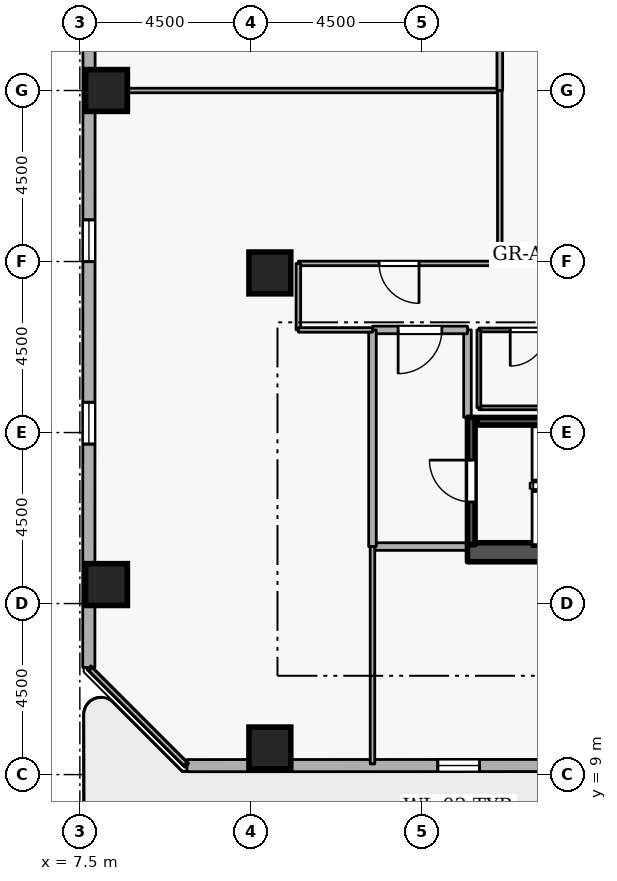
"""IFC4 building model, lengths in metres.
Left out: names, types, materials, properties, quantities, classifications, styles, units other than length and angle.
Written with IfcOpenShell. Run it as: python <this file> out.ifc"""

import sys

from ifc_helpers import new_model, si_unit, direction, frame, frame_2d, origin, origin_2d, place, context, subcontext, project, spatial, rectangle, extrude, element, fill, save


model = new_model("IFC4")
c1 = context("Model", 3, precision=1e-05, world=origin(), true_north=direction((0.0, 1.0)))
c2 = subcontext(c1, "Body", "Model", "MODEL_VIEW")
j1 = project(units=[si_unit("LENGTHUNIT", "METRE"), si_unit("PLANEANGLEUNIT", "RADIAN")], contexts=[c1])
p1 = place(None, origin())
s1 = spatial("IfcSite", under=j1, at=p1, CompositionType="ELEMENT")
p2 = place(p1, origin())
s2 = spatial("IfcBuilding", under=s1, at=p2, CompositionType="ELEMENT")
p3 = place(p2, frame((0.0, 0.0, 174.3)))
s3 = spatial("IfcBuildingStorey", under=s2, at=p3, CompositionType="ELEMENT", Elevation=174.3)
p4 = place(p3, frame((17.7, 14.85, 0.0), z_axis=(0.0, 0.0, 1.0), x_axis=(1.0, 0.0, 0.0)))
e1 = element("IfcWall", 1, at=p4, inside=s3, PredefinedType="SHEAR", context=c2, shape_type="SweptSolid", body=[
    extrude(rectangle(XDim=15.6, YDim=0.5, at=frame_2d((7.8, 0.0))), origin(), (0.0, 0.0, 1.0), 4.2),
])
for number, where, z_axis, x_axis in (
    (2, (12.5, 9.7, 0.0), (0.0, 0.0, 1.0), (1.0, 0.0, 0.0)),
    (3, (8.2, 14.0, 0.0), (0.0, 0.0, 1.0), (1.0, 0.0, 0.0)),
    (4, (8.2, 27.0, 0.0), (0.0, 0.0, 1.0), (1.0, 0.0, 0.0)),
    (5, (12.5, 22.2, 0.0), (0.0, 0.0, 1.0), (1.0, 0.0, 0.0)),
):
    element("IfcColumn", number, at=place(p3, frame(where, z_axis=z_axis, x_axis=x_axis)), inside=s3, PredefinedType="COLUMN", context=c2, shape_type="SweptSolid", body=[
        extrude(rectangle(XDim=1.1, YDim=1.1, at=origin_2d()), origin(), (0.0, 0.0, 1.0), 4.2),
    ])
p5 = place(p3, frame((10.319, 9.235, 0.0), z_axis=(0.0, 0.0, 1.0), x_axis=(0.999999933399, 0.000364968916, 0.0)))
e6 = element("IfcWall", 6, at=p5, inside=s3, PredefinedType="STANDARD", context=c2, shape_type="SweptSolid", body=[
    extrude(rectangle(XDim=32.778, YDim=0.32, at=frame_2d((16.389, 0.0))), origin(), (0.0, 0.0, 1.0), 3.3),
])
p6 = place(p5, frame((23.514, 0.0, 0.0)))
e7 = element("IfcOpeningElement", 7, at=p6, cuts=e6, PredefinedType="OPENING", context=c2, shape_type="SweptSolid", body=[
    extrude(rectangle(XDim=1.15, YDim=2.1, at=frame_2d((0.575, 1.05))), frame((0.0, 0.17, 0.0), z_axis=(0.0, -1.0, 0.0), x_axis=(1.0, 0.0, 0.0)), (0.0, 0.0, 1.0), 0.34),
])
p7 = place(p5, frame((6.6, 0.0, 0.72)))
e8 = element("IfcOpeningElement", 8, at=p7, cuts=e6, PredefinedType="OPENING", context=c2, shape_type="SweptSolid", body=[
    extrude(rectangle(XDim=1.1, YDim=1.8, at=frame_2d((0.55, 0.9))), frame((0.0, 0.17, 0.0), z_axis=(0.0, -1.0, 0.0), x_axis=(1.0, 0.0, 0.0)), (0.0, 0.0, 1.0), 0.34),
])
p8 = place(p5, frame((11.4, 0.0, 0.72)))
e9 = element("IfcOpeningElement", 9, at=p8, cuts=e6, PredefinedType="OPENING", context=c2, shape_type="SweptSolid", body=[
    extrude(rectangle(XDim=1.1, YDim=1.8, at=frame_2d((0.55, 0.9))), frame((0.0, 0.17, 0.0), z_axis=(0.0, -1.0, 0.0), x_axis=(1.0, 0.0, 0.0)), (0.0, 0.0, 1.0), 0.34),
])
p9 = place(p5, frame((21.0, 0.0, 0.72)))
e10 = element("IfcOpeningElement", 10, at=p9, cuts=e6, PredefinedType="OPENING", context=c2, shape_type="SweptSolid", body=[
    extrude(rectangle(XDim=1.1, YDim=1.8, at=frame_2d((0.55, 0.9))), frame((0.0, 0.17, 0.0), z_axis=(0.0, -1.0, 0.0), x_axis=(1.0, 0.0, 0.0)), (0.0, 0.0, 1.0), 0.34),
])
p10 = place(p5, frame((25.8, 0.0, 0.72)))
e11 = element("IfcOpeningElement", 11, at=p10, cuts=e6, PredefinedType="OPENING", context=c2, shape_type="SweptSolid", body=[
    extrude(rectangle(XDim=1.1, YDim=1.8, at=frame_2d((0.55, 0.9))), frame((0.0, 0.17, 0.0), z_axis=(0.0, -1.0, 0.0), x_axis=(1.0, 0.0, 0.0)), (0.0, 0.0, 1.0), 0.34),
])
p11 = place(p3, frame((7.747, 44.596, 0.0), z_axis=(0.0, 0.0, 1.0), x_axis=(-0.000364968916, -0.999999933399, 0.0)))
e12 = element("IfcWall", 12, at=p11, inside=s3, PredefinedType="STANDARD", context=c2, shape_type="SweptSolid", body=[
    extrude(rectangle(XDim=32.778, YDim=0.32, at=frame_2d((16.389, 0.0))), origin(), (0.0, 0.0, 1.0), 3.3),
])
p12 = place(p11, frame((1.8, 0.0, 0.72)))
e13 = element("IfcOpeningElement", 13, at=p12, cuts=e12, PredefinedType="OPENING", context=c2, shape_type="SweptSolid", body=[
    extrude(rectangle(XDim=1.1, YDim=1.8, at=frame_2d((0.55, 0.9))), frame((0.0, 0.17, 0.0), z_axis=(0.0, -1.0, 0.0), x_axis=(1.0, 0.0, 0.0)), (0.0, 0.0, 1.0), 0.34),
])
p13 = place(p11, frame((6.6, 0.0, 0.72)))
e14 = element("IfcOpeningElement", 14, at=p13, cuts=e12, PredefinedType="OPENING", context=c2, shape_type="SweptSolid", body=[
    extrude(rectangle(XDim=1.1, YDim=1.8, at=frame_2d((0.55, 0.9))), frame((0.0, 0.17, 0.0), z_axis=(0.0, -1.0, 0.0), x_axis=(1.0, 0.0, 0.0)), (0.0, 0.0, 1.0), 0.34),
])
p14 = place(p11, frame((11.4, 0.0, 0.72)))
e15 = element("IfcOpeningElement", 15, at=p14, cuts=e12, PredefinedType="OPENING", context=c2, shape_type="SweptSolid", body=[
    extrude(rectangle(XDim=1.1, YDim=1.8, at=frame_2d((0.55, 0.9))), frame((0.0, 0.17, 0.0), z_axis=(0.0, -1.0, 0.0), x_axis=(1.0, 0.0, 0.0)), (0.0, 0.0, 1.0), 0.34),
])
p15 = place(p11, frame((21.0, 0.0, 0.72)))
e16 = element("IfcOpeningElement", 16, at=p15, cuts=e12, PredefinedType="OPENING", context=c2, shape_type="SweptSolid", body=[
    extrude(rectangle(XDim=1.1, YDim=1.8, at=frame_2d((0.55, 0.9))), frame((0.0, 0.17, 0.0), z_axis=(0.0, -1.0, 0.0), x_axis=(1.0, 0.0, 0.0)), (0.0, 0.0, 1.0), 0.34),
])
p16 = place(p11, frame((25.8, 0.0, 0.72)))
e17 = element("IfcOpeningElement", 17, at=p16, cuts=e12, PredefinedType="OPENING", context=c2, shape_type="SweptSolid", body=[
    extrude(rectangle(XDim=1.1, YDim=1.8, at=frame_2d((0.55, 0.9))), frame((0.0, 0.17, 0.0), z_axis=(0.0, -1.0, 0.0), x_axis=(1.0, 0.0, 0.0)), (0.0, 0.0, 1.0), 0.34),
])
p17 = place(p3, frame((17.8, 15.05, 0.0), z_axis=(0.0, 0.0, 1.0), x_axis=(0.0, 1.0, 0.0)))
e18 = element("IfcWall", 18, at=p17, inside=s3, PredefinedType="SHEAR", context=c2, shape_type="SweptSolid", body=[
    extrude(rectangle(XDim=3.35, YDim=0.2, at=frame_2d((1.675, 0.0))), origin(), (0.0, 0.0, 1.0), 4.2),
])
p18 = place(p17, frame((1.125, 0.0, 0.0)))
e19 = element("IfcOpeningElement", 19, at=p18, cuts=e18, PredefinedType="OPENING", context=c2, shape_type="SweptSolid", body=[
    extrude(rectangle(XDim=1.1, YDim=2.1, at=frame_2d((0.55, 1.05))), frame((0.0, 0.11, 0.0), z_axis=(0.0, -1.0, 0.0), x_axis=(1.0, 0.0, 0.0)), (0.0, 0.0, 1.0), 0.22),
])
p19 = place(p3, frame((25.05, 18.297, 0.0), z_axis=(0.0, 0.0, 1.0), x_axis=(-1.0, 0.0, 0.0)))
e20 = element("IfcWall", 20, at=p19, inside=s3, PredefinedType="SHEAR", context=c2, shape_type="SweptSolid", body=[
    extrude(rectangle(XDim=7.1, YDim=0.2, at=frame_2d((3.55, 0.0))), origin(), (0.0, 0.0, 1.0), 4.2),
])
p20 = place(p3, frame((15.2, 15.0, 0.0), z_axis=(0.0, 0.0, 1.0), x_axis=(1.0, 0.0, 0.0)))
e21 = element("IfcWall", 21, at=p20, inside=s3, PredefinedType="STANDARD", context=c2, shape_type="SweptSolid", body=[
    extrude(rectangle(XDim=2.5, YDim=0.2, at=frame_2d((1.25, 0.0))), origin(), (0.0, 0.0, 1.0), 3.94),
])
p21 = place(p3, frame((17.7, 18.4, 0.0), z_axis=(0.0, 0.0, 1.0), x_axis=(0.0, 1.0, 0.0)))
e22 = element("IfcWall", 22, at=p21, inside=s3, PredefinedType="STANDARD", context=c2, shape_type="SweptSolid", body=[
    extrude(rectangle(XDim=2.3, YDim=0.2, at=frame_2d((1.15, 0.0))), origin(), (0.0, 0.0, 1.0), 3.145),
])
p22 = place(p3, frame((17.7, 20.7, 0.0), z_axis=(0.0, 0.0, 1.0), x_axis=(-1.0, 0.0, 0.0)))
e23 = element("IfcWall", 23, at=p22, inside=s3, PredefinedType="STANDARD", context=c2, shape_type="SweptSolid", body=[
    extrude(rectangle(XDim=2.5, YDim=0.2, at=frame_2d((1.25, 0.0))), origin(), (0.0, 0.0, 1.0), 3.94),
])
p23 = place(p22, frame((0.675, 0.0, 0.0)))
e24 = element("IfcOpeningElement", 24, at=p23, cuts=e23, PredefinedType="OPENING", context=c2, shape_type="SweptSolid", body=[
    extrude(rectangle(XDim=1.15, YDim=2.1, at=frame_2d((0.575, 1.05))), frame((0.0, 0.11, 0.0), z_axis=(0.0, -1.0, 0.0), x_axis=(1.0, 0.0, 0.0)), (0.0, 0.0, 1.0), 0.22),
])
p24 = place(p3, frame((15.2, 20.7, 0.0), z_axis=(0.0, 0.0, 1.0), x_axis=(0.0, -1.0, 0.0)))
e25 = element("IfcWall", 25, at=p24, inside=s3, PredefinedType="STANDARD", context=c2, shape_type="SweptSolid", body=[
    extrude(rectangle(XDim=5.7, YDim=0.2, at=frame_2d((2.85, 0.0))), origin(), (0.0, 0.0, 1.0), 3.94),
])
p25 = place(p3, frame((18.0, 18.65, 0.0), z_axis=(0.0, 0.0, 1.0), x_axis=(1.0, 0.0, 0.0)))
e26 = element("IfcWall", 26, at=p25, inside=s3, PredefinedType="PARTITIONING", context=c2, shape_type="SweptSolid", body=[
    extrude(rectangle(XDim=2.6, YDim=0.1, at=frame_2d((1.3, 0.0))), origin(), (0.0, 0.0, 1.0), 3.94),
])
p26 = place(p3, frame((20.6, 20.7, 0.0), z_axis=(0.0, 0.0, 1.0), x_axis=(-1.0, 0.0, 0.0)))
e27 = element("IfcWall", 27, at=p26, inside=s3, PredefinedType="PARTITIONING", context=c2, shape_type="SweptSolid", body=[
    extrude(rectangle(XDim=2.6, YDim=0.1, at=frame_2d((1.3, 0.0))), origin(), (0.0, 0.0, 1.0), 3.94),
])
p27 = place(p26, frame((0.825, 0.0, 0.0)))
e28 = element("IfcOpeningElement", 28, at=p27, cuts=e27, PredefinedType="OPENING", context=c2, shape_type="SweptSolid", body=[
    extrude(rectangle(XDim=0.95, YDim=2.1, at=frame_2d((0.475, 1.05))), frame((0.0, 0.06, 0.0), z_axis=(0.0, -1.0, 0.0), x_axis=(1.0, 0.0, 0.0)), (0.0, 0.0, 1.0), 0.12),
])
p28 = place(p3, frame((18.0, 20.7, 0.0), z_axis=(0.0, 0.0, 1.0), x_axis=(0.0, -1.0, 0.0)))
e29 = element("IfcWall", 29, at=p28, inside=s3, PredefinedType="PARTITIONING", context=c2, shape_type="SweptSolid", body=[
    extrude(rectangle(XDim=2.05, YDim=0.1, at=frame_2d((1.025, 0.0))), origin(), (0.0, 0.0, 1.0), 3.145),
])
p29 = place(p3, frame((7.78, 27.0, 0.0), z_axis=(0.0, 0.0, 1.0), x_axis=(1.0, 0.0, 0.0)))
e30 = element("IfcWall", 30, at=p29, inside=s3, PredefinedType="PARTITIONING", context=c2, shape_type="SweptSolid", body=[
    extrude(rectangle(XDim=10.77, YDim=0.12, at=frame_2d((5.385, 0.0))), origin(), (0.0, 0.0, 1.0), 3.532),
])
p30 = place(p3, frame((18.55, 27.0, 0.0), z_axis=(0.0, 0.0, 1.0), x_axis=(0.0, -1.0, 0.0)))
e31 = element("IfcWall", 31, at=p30, inside=s3, PredefinedType="PARTITIONING", context=c2, shape_type="SweptSolid", body=[
    extrude(rectangle(XDim=4.55, YDim=0.12, at=frame_2d((2.275, 0.0))), origin(), (0.0, 0.0, 1.0), 3.94),
])
p31 = place(p3, frame((18.55, 22.45, 0.0), z_axis=(0.0, 0.0, 1.0), x_axis=(-1.0, 0.0, 0.0)))
e32 = element("IfcWall", 32, at=p31, inside=s3, PredefinedType="PARTITIONING", context=c2, shape_type="SweptSolid", body=[
    extrude(rectangle(XDim=5.3, YDim=0.12, at=frame_2d((2.65, 0.0))), origin(), (0.0, 0.0, 1.0), 3.94),
])
p32 = place(p31, frame((2.125, 0.0, 0.0)))
e33 = element("IfcOpeningElement", 33, at=p32, cuts=e32, PredefinedType="OPENING", context=c2, shape_type="SweptSolid", body=[
    extrude(rectangle(XDim=1.05, YDim=2.1, at=frame_2d((0.525, 1.05))), frame((0.0, 0.07, 0.0), z_axis=(0.0, -1.0, 0.0), x_axis=(1.0, 0.0, 0.0)), (0.0, 0.0, 1.0), 0.14),
])
p33 = place(p3, frame((13.25, 22.45, 0.0), z_axis=(0.0, 0.0, 1.0), x_axis=(0.0, -1.0, 0.0)))
e34 = element("IfcWall", 34, at=p33, inside=s3, PredefinedType="PARTITIONING", context=c2, shape_type="SweptSolid", body=[
    extrude(rectangle(XDim=1.75, YDim=0.12, at=frame_2d((0.875, 0.0))), origin(), (0.0, 0.0, 1.0), 3.94),
])
p34 = place(p3, frame((13.25, 20.7, 0.0), z_axis=(0.0, 0.0, 1.0), x_axis=(1.0, 0.0, 0.0)))
e35 = element("IfcWall", 35, at=p34, inside=s3, PredefinedType="PARTITIONING", context=c2, shape_type="SweptSolid", body=[
    extrude(rectangle(XDim=1.95, YDim=0.12, at=frame_2d((0.975, 0.0))), origin(), (0.0, 0.0, 1.0), 3.94),
])
p35 = place(p3, frame((15.2, 15.0, 0.0), z_axis=(0.0, 0.0, 1.0), x_axis=(0.0, -1.0, 0.0)))
e36 = element("IfcWall", 36, at=p35, inside=s3, PredefinedType="PARTITIONING", context=c2, shape_type="SweptSolid", body=[
    extrude(rectangle(XDim=5.72, YDim=0.12, at=frame_2d((2.86, 0.0))), origin(), (0.0, 0.0, 1.0), 3.94),
])
p36 = place(p3, frame((10.275, 9.28, 0.0), z_axis=(0.0, 0.0, 1.0), x_axis=(-0.707106781187, 0.707106781187, 0.0)))
e37 = element("IfcWall", 37, at=p36, inside=s3, PredefinedType="PARTITIONING", context=c2, shape_type="SweptSolid", body=[
    extrude(rectangle(XDim=3.528, YDim=0.12, at=frame_2d((1.764, 0.0))), origin(), (0.0, 0.0, 1.0), 3.94),
])
p37 = place(p3, frame((18.55, 31.55, 0.0), z_axis=(0.0, 0.0, 1.0), x_axis=(0.0, -1.0, 0.0)))
e38 = element("IfcWall", 38, at=p37, inside=s3, PredefinedType="PARTITIONING", context=c2, shape_type="SweptSolid", body=[
    extrude(rectangle(XDim=4.55, YDim=0.15, at=frame_2d((2.275, 0.0))), origin(), (0.0, 0.0, 1.0), 3.94),
])
p38 = place(p7, origin())
e39 = element("IfcWindow", 39, at=p38, inside=s3, PartitioningType="SINGLE_PANEL", PredefinedType="WINDOW", context=c2, shape_type="SweptSolid", body=[
    extrude(rectangle(XDim=1.1, YDim=1.8, at=frame_2d((0.55, 0.9))), frame((0.0, 0.03, 0.0), z_axis=(0.0, -1.0, 0.0), x_axis=(1.0, 0.0, 0.0)), (0.0, 0.0, 1.0), 0.06),
])
fill(e8, e39)
p39 = place(p15, origin())
e40 = element("IfcWindow", 40, at=p39, inside=s3, PartitioningType="SINGLE_PANEL", PredefinedType="WINDOW", context=c2, shape_type="SweptSolid", body=[
    extrude(rectangle(XDim=1.1, YDim=1.8, at=frame_2d((0.55, 0.9))), frame((0.0, 0.03, 0.0), z_axis=(0.0, -1.0, 0.0), x_axis=(1.0, 0.0, 0.0)), (0.0, 0.0, 1.0), 0.06),
])
fill(e16, e40)
p40 = place(p16, origin())
e41 = element("IfcWindow", 41, at=p40, inside=s3, PartitioningType="SINGLE_PANEL", PredefinedType="WINDOW", context=c2, shape_type="SweptSolid", body=[
    extrude(rectangle(XDim=1.1, YDim=1.8, at=frame_2d((0.55, 0.9))), frame((0.0, 0.03, 0.0), z_axis=(0.0, -1.0, 0.0), x_axis=(1.0, 0.0, 0.0)), (0.0, 0.0, 1.0), 0.06),
])
fill(e17, e41)
p41 = place(p18, origin())
e42 = element("IfcDoor", 42, at=p41, inside=s3, OperationType="SINGLE_SWING_RIGHT", PredefinedType="DOOR", context=c2, shape_type="SweptSolid", body=[
    extrude(rectangle(XDim=1.1, YDim=2.1, at=frame_2d((0.55, 1.05))), frame((0.0, 0.025, 0.0), z_axis=(0.0, -1.0, 0.0), x_axis=(1.0, 0.0, 0.0)), (0.0, 0.0, 1.0), 0.05),
])
fill(e19, e42)
p42 = place(p23, origin())
e43 = element("IfcDoor", 43, at=p42, inside=s3, OperationType="SINGLE_SWING_RIGHT", PredefinedType="DOOR", context=c2, shape_type="SweptSolid", body=[
    extrude(rectangle(XDim=1.15, YDim=2.1, at=frame_2d((0.575, 1.05))), frame((0.0, 0.025, 0.0), z_axis=(0.0, -1.0, 0.0), x_axis=(1.0, 0.0, 0.0)), (0.0, 0.0, 1.0), 0.05),
])
fill(e24, e43)
p43 = place(p27, origin())
e44 = element("IfcDoor", 44, at=p43, inside=s3, OperationType="SINGLE_SWING_RIGHT", PredefinedType="DOOR", context=c2, shape_type="SweptSolid", body=[
    extrude(rectangle(XDim=0.95, YDim=2.1, at=frame_2d((0.475, 1.05))), frame((0.0, 0.025, 0.0), z_axis=(0.0, -1.0, 0.0), x_axis=(1.0, 0.0, 0.0)), (0.0, 0.0, 1.0), 0.05),
])
fill(e28, e44)
p44 = place(p32, origin())
e45 = element("IfcDoor", 45, at=p44, inside=s3, OperationType="SINGLE_SWING_LEFT", PredefinedType="DOOR", context=c2, shape_type="SweptSolid", body=[
    extrude(rectangle(XDim=1.05, YDim=2.1, at=frame_2d((0.525, 1.05))), frame((0.0, 0.025, 0.0), z_axis=(0.0, -1.0, 0.0), x_axis=(1.0, 0.0, 0.0)), (0.0, 0.0, 1.0), 0.05),
])
fill(e33, e45)
save(model, sys.argv[1])
